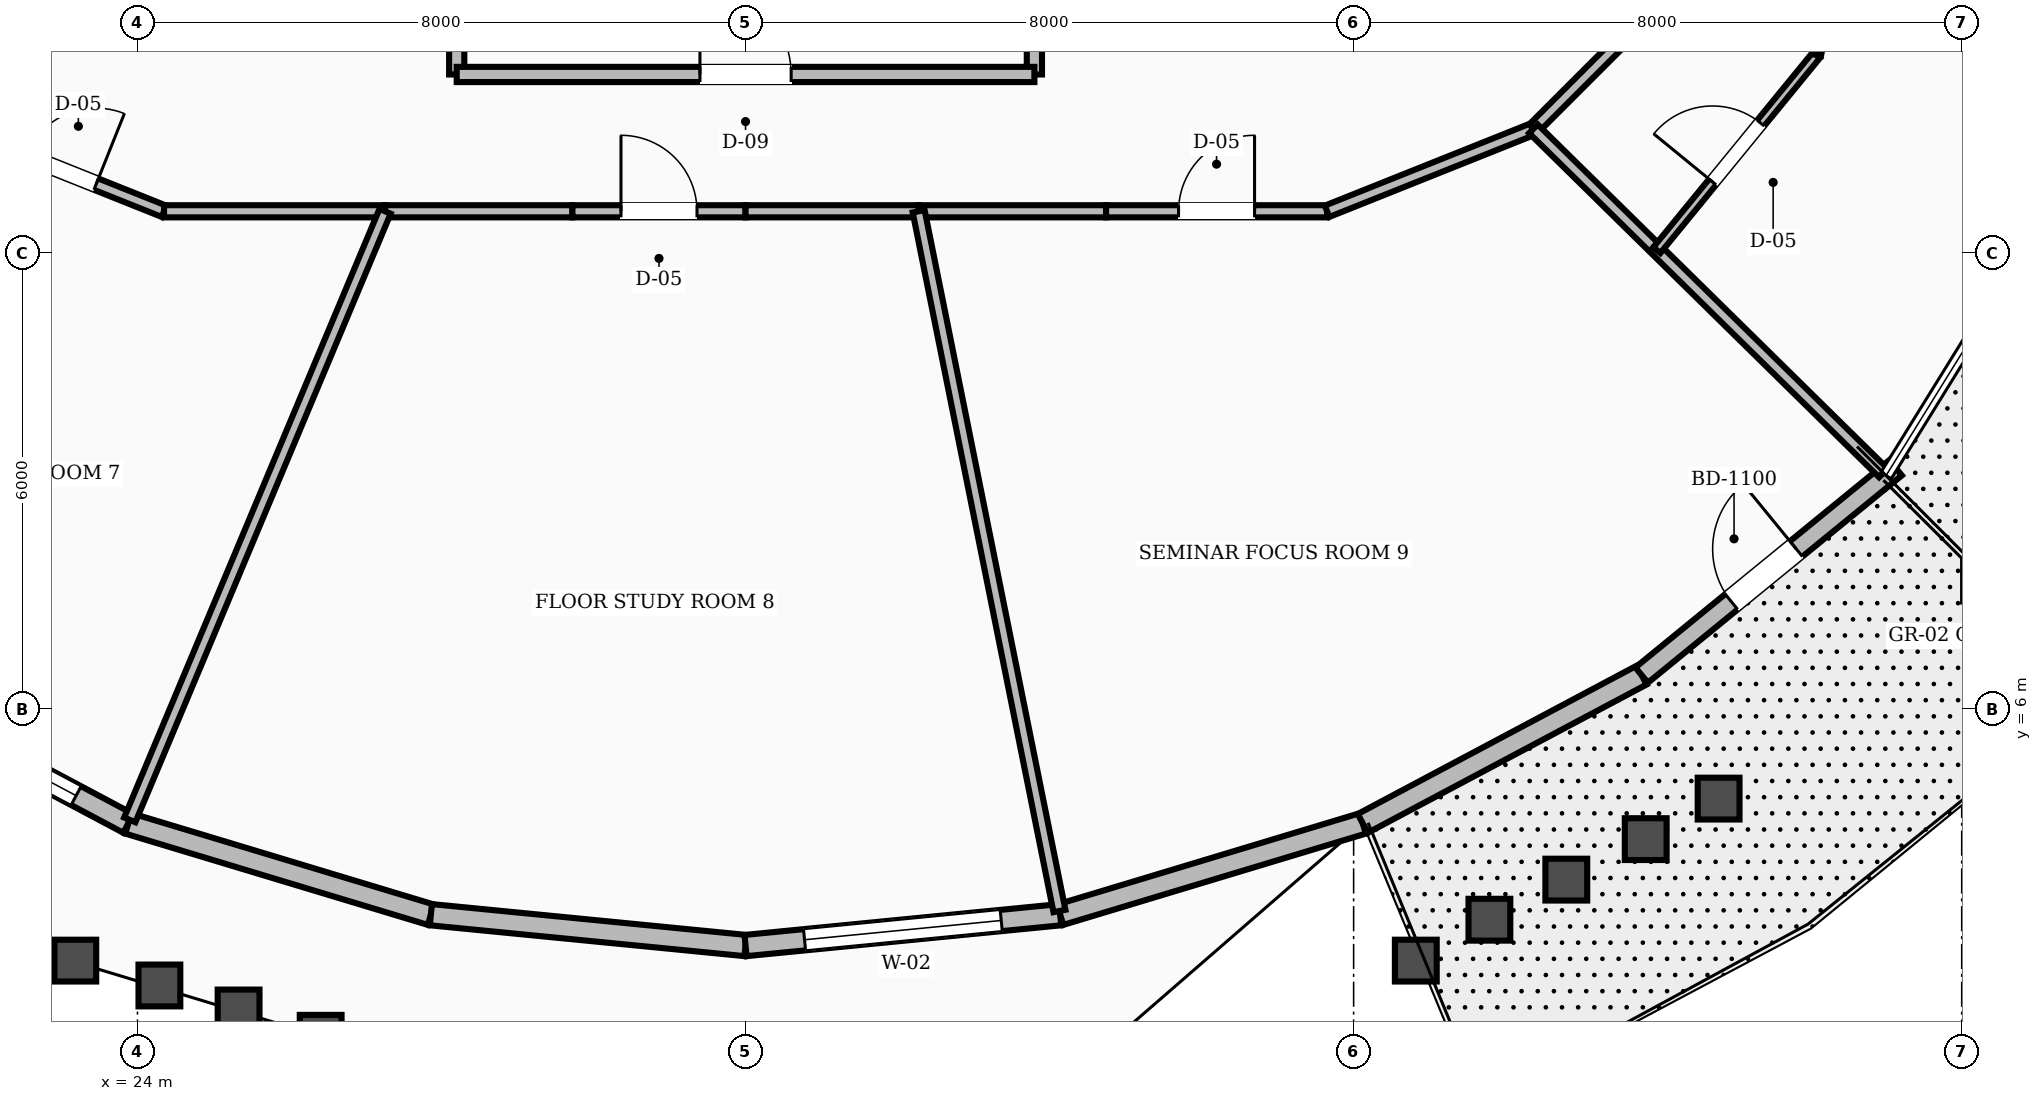
"""IFC4 building model, lengths in metres.
Left out: names, types, materials, properties, quantities, classifications, styles, units other than length and angle.
Written with IfcOpenShell. Run it as: python <this file> out.ifc"""

import sys

from ifc_helpers import new_model, si_unit, direction, frame, frame_2d, origin, place, context, subcontext, project, spatial, rectangle, extrude, element, fill, save


model = new_model("IFC4")
c1 = context("Model", 3, precision=1e-05, world=origin(), true_north=direction((0.0, 1.0)))
c2 = subcontext(c1, "Body", "Model", "MODEL_VIEW")
j1 = project(units=[si_unit("LENGTHUNIT", "METRE"), si_unit("PLANEANGLEUNIT", "RADIAN")], contexts=[c1])
p1 = place(None, origin())
s1 = spatial("IfcSite", under=j1, at=p1, CompositionType="ELEMENT")
p2 = place(p1, origin())
s2 = spatial("IfcBuilding", under=s1, at=p2, CompositionType="ELEMENT")
p3 = place(p2, frame((0.0, 0.0, 247.2)))
s3 = spatial("IfcBuildingStorey", under=s2, at=p3, CompositionType="ELEMENT", Elevation=247.2)
p4 = place(p3, frame((20.211, 6.448, 0.0), z_axis=(0.0, 0.0, 1.0), x_axis=(0.88293458377, -0.469496028506, 0.0)))
e1 = element("IfcWall", 1, at=p4, inside=s3, PredefinedType="STANDARD", context=c2, shape_type="SweptSolid", body=[
    extrude(rectangle(XDim=4.155, YDim=0.28, at=frame_2d((2.077, 0.0))), origin(), (0.0, 0.0, 1.0), 2.88),
])
p5 = place(p4, frame((0.778, 0.0, 0.8)))
e2 = element("IfcOpeningElement", 2, at=p5, cuts=e1, PredefinedType="OPENING", context=c2, shape_type="SweptSolid", body=[
    extrude(rectangle(XDim=2.6, YDim=1.65, at=frame_2d((1.3, 0.825))), frame((0.0, 0.15, 0.0), z_axis=(0.0, -1.0, 0.0), x_axis=(1.0, 0.0, 0.0)), (0.0, 0.0, 1.0), 0.3),
])
p6 = place(p3, frame((23.879, 4.497, 0.0), z_axis=(0.0, 0.0, 1.0), x_axis=(0.957348244256, -0.288936566083, 0.0)))
e3 = element("IfcWall", 3, at=p6, inside=s3, PredefinedType="STANDARD", context=c2, shape_type="SweptSolid", body=[
    extrude(rectangle(XDim=4.158, YDim=0.28, at=frame_2d((2.079, 0.0))), origin(), (0.0, 0.0, 1.0), 2.88),
])
p7 = place(p3, frame((27.86, 3.296, 0.0), z_axis=(0.0, 0.0, 1.0), x_axis=(0.995236791144, -0.09748707378, 0.0)))
e4 = element("IfcWall", 4, at=p7, inside=s3, PredefinedType="STANDARD", context=c2, shape_type="SweptSolid", body=[
    extrude(rectangle(XDim=4.16, YDim=0.28, at=frame_2d((2.08, 0.0))), origin(), (0.0, 0.0, 1.0), 2.88),
])
p8 = place(p3, frame((32.0, 2.89, 0.0), z_axis=(0.0, 0.0, 1.0), x_axis=(0.995236791144, 0.09748707378, 0.0)))
e5 = element("IfcWall", 5, at=p8, inside=s3, PredefinedType="STANDARD", context=c2, shape_type="SweptSolid", body=[
    extrude(rectangle(XDim=4.16, YDim=0.28, at=frame_2d((2.08, 0.0))), origin(), (0.0, 0.0, 1.0), 2.88),
])
p9 = place(p8, frame((0.78, 0.0, 0.8)))
e6 = element("IfcOpeningElement", 6, at=p9, cuts=e5, PredefinedType="OPENING", context=c2, shape_type="SweptSolid", body=[
    extrude(rectangle(XDim=2.6, YDim=1.65, at=frame_2d((1.3, 0.825))), frame((0.0, 0.15, 0.0), z_axis=(0.0, -1.0, 0.0), x_axis=(1.0, 0.0, 0.0)), (0.0, 0.0, 1.0), 0.3),
])
p10 = place(p3, frame((36.14, 3.296, 0.0), z_axis=(0.0, 0.0, 1.0), x_axis=(0.957348244256, 0.288936566083, 0.0)))
e7 = element("IfcWall", 7, at=p10, inside=s3, PredefinedType="STANDARD", context=c2, shape_type="SweptSolid", body=[
    extrude(rectangle(XDim=4.158, YDim=0.28, at=frame_2d((2.079, 0.0))), origin(), (0.0, 0.0, 1.0), 2.88),
])
p11 = place(p3, frame((40.121, 4.497, 0.0), z_axis=(0.0, 0.0, 1.0), x_axis=(0.88293458377, 0.469496028506, 0.0)))
e8 = element("IfcWall", 8, at=p11, inside=s3, PredefinedType="STANDARD", context=c2, shape_type="SweptSolid", body=[
    extrude(rectangle(XDim=4.155, YDim=0.28, at=frame_2d((2.077, 0.0))), origin(), (0.0, 0.0, 1.0), 2.88),
])
p12 = place(p3, frame((43.789, 6.448, 0.0), z_axis=(0.0, 0.0, 1.0), x_axis=(0.774617624574, 0.63242986623, 0.0)))
e9 = element("IfcWall", 9, at=p12, inside=s3, PredefinedType="STANDARD", context=c2, shape_type="SweptSolid", body=[
    extrude(rectangle(XDim=4.313, YDim=0.26, at=frame_2d((2.157, 0.0))), origin(), (0.0, 0.0, 1.0), 2.88),
])
p13 = place(p12, frame((1.526, 0.0, 0.0)))
e10 = element("IfcOpeningElement", 10, at=p13, cuts=e9, PredefinedType="OPENING", context=c2, shape_type="SweptSolid", body=[
    extrude(rectangle(XDim=1.1, YDim=2.15, at=frame_2d((0.55, 1.075))), frame((0.0, 0.14, 0.0), z_axis=(0.0, -1.0, 0.0), x_axis=(1.0, 0.0, 0.0)), (0.0, 0.0, 1.0), 0.28),
])
for number, where, z_axis, x_axis in (
    (11, (28.2, 14.35, 0.0), (0.0, 0.0, 1.0), (0.0, 1.0, 0.0)),
    (12, (35.8, 14.35, 0.0), (0.0, 0.0, 1.0), (0.0, 1.0, 0.0)),
):
    element("IfcWall", number, at=place(p3, frame(where, z_axis=z_axis, x_axis=x_axis)), inside=s3, PredefinedType="SOLIDWALL", context=c2, shape_type="SweptSolid", body=[
        extrude(rectangle(XDim=2.2, YDim=0.2, at=frame_2d((1.1, 0.0))), origin(), (0.0, 0.0, 1.0), 2.87),
    ])
p14 = place(p3, frame((28.2, 14.35, 0.0), z_axis=(0.0, 0.0, 1.0), x_axis=(1.0, 0.0, 0.0)))
e13 = element("IfcWall", 13, at=p14, inside=s3, PredefinedType="SOLIDWALL", context=c2, shape_type="SweptSolid", body=[
    extrude(rectangle(XDim=7.6, YDim=0.2, at=frame_2d((3.8, 0.0))), origin(), (0.0, 0.0, 1.0), 2.87),
])
p15 = place(p14, frame((3.2, 0.0, 0.0)))
e14 = element("IfcOpeningElement", 14, at=p15, cuts=e13, PredefinedType="OPENING", context=c2, shape_type="SweptSolid", body=[
    extrude(rectangle(XDim=1.2, YDim=2.1, at=frame_2d((0.6, 1.05))), frame((0.0, 0.11, 0.0), z_axis=(0.0, -1.0, 0.0), x_axis=(1.0, 0.0, 0.0)), (0.0, 0.0, 1.0), 0.22),
])
p16 = place(p3, frame((21.635, 13.635, 0.0), z_axis=(0.0, 0.0, 1.0), x_axis=(0.92856882165, -0.371160266542, 0.0)))
e15 = element("IfcWall", 15, at=p16, inside=s3, PredefinedType="SOLIDWALL", context=c2, shape_type="SweptSolid", body=[
    extrude(rectangle(XDim=2.923, YDim=0.16, at=frame_2d((1.461, 0.0))), origin(), (0.0, 0.0, 1.0), 2.87),
])
p17 = place(p16, frame((0.962, 0.0, 0.0)))
e16 = element("IfcOpeningElement", 16, at=p17, cuts=e15, PredefinedType="OPENING", context=c2, shape_type="SweptSolid", body=[
    extrude(rectangle(XDim=1.0, YDim=2.1, at=frame_2d((0.5, 1.05))), frame((0.0, 0.09, 0.0), z_axis=(0.0, -1.0, 0.0), x_axis=(1.0, 0.0, 0.0)), (0.0, 0.0, 1.0), 0.18),
])
p18 = place(p3, frame((24.349, 12.55, 0.0), z_axis=(0.0, 0.0, 1.0), x_axis=(1.0, 0.0, 0.0)))
e17 = element("IfcWall", 17, at=p18, inside=s3, PredefinedType="SOLIDWALL", context=c2, shape_type="SweptSolid", body=[
    extrude(rectangle(XDim=2.908, YDim=0.16, at=frame_2d((1.454, 0.0))), origin(), (0.0, 0.0, 1.0), 2.87),
])
p19 = place(p3, frame((27.257, 12.55, 0.0), z_axis=(0.0, 0.0, 1.0), x_axis=(1.0, 0.0, 0.0)))
e18 = element("IfcWall", 18, at=p19, inside=s3, PredefinedType="SOLIDWALL", context=c2, shape_type="SweptSolid", body=[
    extrude(rectangle(XDim=2.465, YDim=0.16, at=frame_2d((1.232, 0.0))), origin(), (0.0, 0.0, 1.0), 2.87),
])
p20 = place(p3, frame((29.722, 12.55, 0.0), z_axis=(0.0, 0.0, 1.0), x_axis=(1.0, 0.0, 0.0)))
e19 = element("IfcWall", 19, at=p20, inside=s3, PredefinedType="SOLIDWALL", context=c2, shape_type="SweptSolid", body=[
    extrude(rectangle(XDim=2.278, YDim=0.16, at=frame_2d((1.139, 0.0))), origin(), (0.0, 0.0, 1.0), 2.87),
])
p21 = place(p20, frame((0.639, 0.0, 0.0)))
e20 = element("IfcOpeningElement", 20, at=p21, cuts=e19, PredefinedType="OPENING", context=c2, shape_type="SweptSolid", body=[
    extrude(rectangle(XDim=1.0, YDim=2.1, at=frame_2d((0.5, 1.05))), frame((0.0, 0.09, 0.0), z_axis=(0.0, -1.0, 0.0), x_axis=(1.0, 0.0, 0.0)), (0.0, 0.0, 1.0), 0.18),
])
p22 = place(p3, frame((32.0, 12.55, 0.0), z_axis=(0.0, 0.0, 1.0), x_axis=(1.0, 0.0, 0.0)))
e21 = element("IfcWall", 21, at=p22, inside=s3, PredefinedType="SOLIDWALL", context=c2, shape_type="SweptSolid", body=[
    extrude(rectangle(XDim=2.278, YDim=0.16, at=frame_2d((1.139, 0.0))), origin(), (0.0, 0.0, 1.0), 2.87),
])
p23 = place(p3, frame((34.278, 12.55, 0.0), z_axis=(0.0, 0.0, 1.0), x_axis=(1.0, 0.0, 0.0)))
e22 = element("IfcWall", 22, at=p23, inside=s3, PredefinedType="SOLIDWALL", context=c2, shape_type="SweptSolid", body=[
    extrude(rectangle(XDim=2.465, YDim=0.16, at=frame_2d((1.232, 0.0))), origin(), (0.0, 0.0, 1.0), 2.87),
])
p24 = place(p3, frame((36.743, 12.55, 0.0), z_axis=(0.0, 0.0, 1.0), x_axis=(1.0, 0.0, 0.0)))
e23 = element("IfcWall", 23, at=p24, inside=s3, PredefinedType="SOLIDWALL", context=c2, shape_type="SweptSolid", body=[
    extrude(rectangle(XDim=2.908, YDim=0.16, at=frame_2d((1.454, 0.0))), origin(), (0.0, 0.0, 1.0), 2.87),
])
p25 = place(p24, frame((0.954, 0.0, 0.0)))
e24 = element("IfcOpeningElement", 24, at=p25, cuts=e23, PredefinedType="OPENING", context=c2, shape_type="SweptSolid", body=[
    extrude(rectangle(XDim=1.0, YDim=2.1, at=frame_2d((0.5, 1.05))), frame((0.0, 0.09, 0.0), z_axis=(0.0, -1.0, 0.0), x_axis=(1.0, 0.0, 0.0)), (0.0, 0.0, 1.0), 0.18),
])
p26 = place(p3, frame((39.651, 12.55, 0.0), z_axis=(0.0, 0.0, 1.0), x_axis=(0.92856882165, 0.371160266542, 0.0)))
e25 = element("IfcWall", 25, at=p26, inside=s3, PredefinedType="SOLIDWALL", context=c2, shape_type="SweptSolid", body=[
    extrude(rectangle(XDim=2.923, YDim=0.16, at=frame_2d((1.461, 0.0))), origin(), (0.0, 0.0, 1.0), 2.87),
])
p27 = place(p3, frame((42.365, 13.635, 0.0), z_axis=(0.0, 0.0, 1.0), x_axis=(0.707106781187, 0.707106781187, 0.0)))
e26 = element("IfcWall", 26, at=p27, inside=s3, PredefinedType="SOLIDWALL", context=c2, shape_type="SweptSolid", body=[
    extrude(rectangle(XDim=2.916, YDim=0.16, at=frame_2d((1.458, 0.0))), origin(), (0.0, 0.0, 1.0), 2.87),
])
p28 = place(p3, frame((42.365, 13.635, 0.0), z_axis=(0.0, 0.0, 1.0), x_axis=(0.713074718059, -0.701088044731, 0.0)))
e27 = element("IfcWall", 27, at=p28, inside=s3, PredefinedType="SOLIDWALL", context=c2, shape_type="SweptSolid", body=[
    extrude(rectangle(XDim=6.457, YDim=0.16, at=frame_2d((3.228, 0.0))), origin(), (0.0, 0.0, 1.0), 2.87),
])
p29 = place(p3, frame((43.989, 12.038, 0.0), z_axis=(0.0, 0.0, 1.0), x_axis=(0.633057472725, 0.774104796669, 0.0)))
e28 = element("IfcWall", 28, at=p29, inside=s3, PredefinedType="PARTITIONING", context=c2, shape_type="SweptSolid", body=[
    extrude(rectangle(XDim=3.318, YDim=0.12, at=frame_2d((1.659, 0.0))), origin(), (0.0, 0.0, 1.0), 2.87),
])
p30 = place(p29, frame((1.159, 0.0, 0.0)))
e29 = element("IfcOpeningElement", 29, at=p30, cuts=e28, PredefinedType="OPENING", context=c2, shape_type="SweptSolid", body=[
    extrude(rectangle(XDim=1.0, YDim=2.1, at=frame_2d((0.5, 1.05))), frame((0.0, 0.07, 0.0), z_axis=(0.0, -1.0, 0.0), x_axis=(1.0, 0.0, 0.0)), (0.0, 0.0, 1.0), 0.14),
])
p31 = place(p3, frame((46.09, 14.607, 0.0), z_axis=(0.0, 0.0, 1.0), x_axis=(0.20950424044, 0.977807738381, 0.0)))
e30 = element("IfcWall", 30, at=p31, inside=s3, PredefinedType="PARTITIONING", context=c2, shape_type="SweptSolid", body=[
    extrude(rectangle(XDim=3.355, YDim=0.12, at=frame_2d((1.677, 0.0))), origin(), (0.0, 0.0, 1.0), 2.87),
])
p32 = place(p3, frame((27.257, 12.55, 0.0), z_axis=(0.0, 0.0, 1.0), x_axis=(-0.386818468204, -0.922155883057, 0.0)))
e31 = element("IfcWall", 31, at=p32, inside=s3, PredefinedType="SOLIDWALL", context=c2, shape_type="SweptSolid", body=[
    extrude(rectangle(XDim=8.683, YDim=0.16, at=frame_2d((4.341, 0.0))), origin(), (0.0, 0.0, 1.0), 2.87),
])
p33 = place(p3, frame((34.278, 12.55, 0.0), z_axis=(0.0, 0.0, 1.0), x_axis=(0.197271052083, -0.980348984806, 0.0)))
e32 = element("IfcWall", 32, at=p33, inside=s3, PredefinedType="SOLIDWALL", context=c2, shape_type="SweptSolid", body=[
    extrude(rectangle(XDim=9.39, YDim=0.16, at=frame_2d((4.695, 0.0))), origin(), (0.0, 0.0, 1.0), 2.87),
])
p34 = place(p5, origin())
e33 = element("IfcWindow", 33, at=p34, inside=s3, PartitioningType="SINGLE_PANEL", PredefinedType="WINDOW", context=c2, shape_type="SweptSolid", body=[
    extrude(rectangle(XDim=2.6, YDim=1.65, at=frame_2d((1.3, 0.825))), frame((0.0, 0.03, 0.0), z_axis=(0.0, -1.0, 0.0), x_axis=(1.0, 0.0, 0.0)), (0.0, 0.0, 1.0), 0.06),
])
fill(e2, e33)
p35 = place(p9, origin())
e34 = element("IfcWindow", 34, at=p35, inside=s3, PartitioningType="SINGLE_PANEL", PredefinedType="WINDOW", context=c2, shape_type="SweptSolid", body=[
    extrude(rectangle(XDim=2.6, YDim=1.65, at=frame_2d((1.3, 0.825))), frame((0.0, 0.03, 0.0), z_axis=(0.0, -1.0, 0.0), x_axis=(1.0, 0.0, 0.0)), (0.0, 0.0, 1.0), 0.06),
])
fill(e6, e34)
p36 = place(p13, origin())
e35 = element("IfcDoor", 35, at=p36, inside=s3, OperationType="SINGLE_SWING_RIGHT", PredefinedType="DOOR", context=c2, shape_type="SweptSolid", body=[
    extrude(rectangle(XDim=1.1, YDim=2.15, at=frame_2d((0.55, 1.075))), frame((0.0, 0.025, 0.0), z_axis=(0.0, -1.0, 0.0), x_axis=(1.0, 0.0, 0.0)), (0.0, 0.0, 1.0), 0.05),
])
fill(e10, e35)
p37 = place(p15, origin())
e36 = element("IfcDoor", 36, at=p37, inside=s3, OperationType="SINGLE_SWING_LEFT", PredefinedType="DOOR", context=c2, shape_type="SweptSolid", body=[
    extrude(rectangle(XDim=1.2, YDim=2.1, at=frame_2d((0.6, 1.05))), frame((0.0, 0.025, 0.0), z_axis=(0.0, -1.0, 0.0), x_axis=(1.0, 0.0, 0.0)), (0.0, 0.0, 1.0), 0.05),
])
fill(e14, e36)
p38 = place(p30, origin())
e37 = element("IfcDoor", 37, at=p38, inside=s3, OperationType="SINGLE_SWING_LEFT", PredefinedType="DOOR", context=c2, shape_type="SweptSolid", body=[
    extrude(rectangle(XDim=1.0, YDim=2.1, at=frame_2d((0.5, 1.05))), frame((0.0, 0.025, 0.0), z_axis=(0.0, -1.0, 0.0), x_axis=(1.0, 0.0, 0.0)), (0.0, 0.0, 1.0), 0.05),
])
fill(e29, e37)
p39 = place(p17, origin())
e38 = element("IfcDoor", 38, at=p39, inside=s3, OperationType="SINGLE_SWING_RIGHT", PredefinedType="DOOR", context=c2, shape_type="SweptSolid", body=[
    extrude(rectangle(XDim=1.0, YDim=2.1, at=frame_2d((0.5, 1.05))), frame((0.0, 0.025, 0.0), z_axis=(0.0, -1.0, 0.0), x_axis=(1.0, 0.0, 0.0)), (0.0, 0.0, 1.0), 0.05),
])
fill(e16, e38)
p40 = place(p21, origin())
e39 = element("IfcDoor", 39, at=p40, inside=s3, OperationType="SINGLE_SWING_LEFT", PredefinedType="DOOR", context=c2, shape_type="SweptSolid", body=[
    extrude(rectangle(XDim=1.0, YDim=2.1, at=frame_2d((0.5, 1.05))), frame((0.0, 0.025, 0.0), z_axis=(0.0, -1.0, 0.0), x_axis=(1.0, 0.0, 0.0)), (0.0, 0.0, 1.0), 0.05),
])
fill(e20, e39)
p41 = place(p25, origin())
e40 = element("IfcDoor", 40, at=p41, inside=s3, OperationType="SINGLE_SWING_RIGHT", PredefinedType="DOOR", context=c2, shape_type="SweptSolid", body=[
    extrude(rectangle(XDim=1.0, YDim=2.1, at=frame_2d((0.5, 1.05))), frame((0.0, 0.025, 0.0), z_axis=(0.0, -1.0, 0.0), x_axis=(1.0, 0.0, 0.0)), (0.0, 0.0, 1.0), 0.05),
])
fill(e24, e40)
save(model, sys.argv[1])
